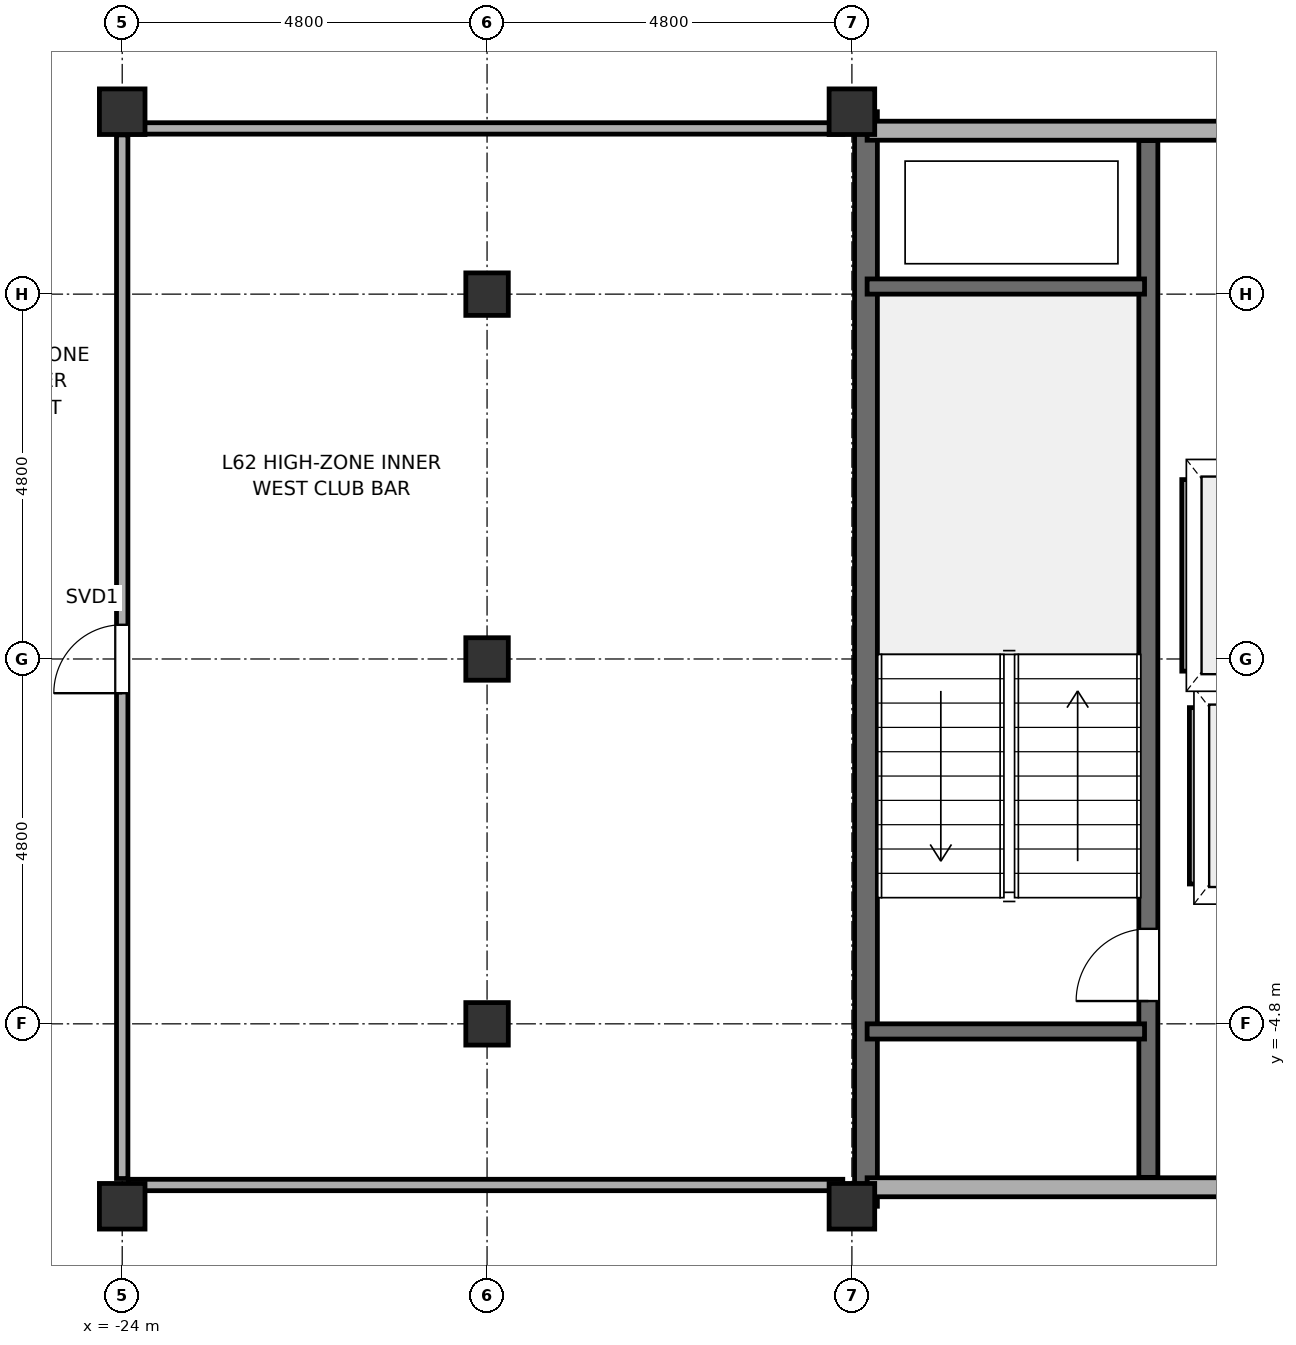
"""IFC4 building model, lengths in metres.
Left out: names, types, materials, properties, quantities, classifications, styles, units other than length and angle.
Written with IfcOpenShell. Run it as: python <this file> out.ifc"""

import sys

from ifc_helpers import new_model, si_unit, direction, frame, frame_2d, origin, origin_2d, place, context, subcontext, project, spatial, rectangle, hollow_rectangle, hollow_circle, extrude, element, fill, save


model = new_model("IFC4")
c1 = context("Model", 3, precision=1e-05, world=origin(), true_north=direction((0.0, 1.0)))
c2 = subcontext(c1, "Body", "Model", "MODEL_VIEW")
j1 = project(units=[si_unit("LENGTHUNIT", "METRE"), si_unit("PLANEANGLEUNIT", "RADIAN")], contexts=[c1])
p1 = place(None, origin())
s1 = spatial("IfcSite", under=j1, at=p1, CompositionType="ELEMENT")
p2 = place(p1, origin())
s2 = spatial("IfcBuilding", under=s1, at=p2, CompositionType="ELEMENT")
p3 = place(p2, frame((0.0, 0.0, 249.25)))
s3 = spatial("IfcBuildingStorey", under=s2, at=p3, CompositionType="ELEMENT", Elevation=249.25)
for number, where, z_axis, x_axis in (
    (1, (-24.0, -7.2, 0.0), (0.0, 0.0, 1.0), (1.0, 0.0, 0.0)),
    (2, (-24.0, 7.2, 0.0), (0.0, 0.0, 1.0), (1.0, 0.0, 0.0)),
):
    element("IfcColumn", number, at=place(p3, frame(where, z_axis=z_axis, x_axis=x_axis)), inside=s3, PredefinedType="COLUMN", context=c2, shape_type="SweptSolid", body=[
        extrude(hollow_rectangle(XDim=0.6, YDim=0.6, WallThickness=0.028, at=origin_2d()), origin(), (0.0, 0.0, 1.0), 3.85),
    ])
for number, where, z_axis, x_axis in (
    (3, (-19.2, -4.8, 0.0), (0.0, 0.0, 1.0), (1.0, 0.0, 0.0)),
    (4, (-19.2, 0.0, 0.0), (0.0, 0.0, 1.0), (1.0, 0.0, 0.0)),
    (5, (-19.2, 4.8, 0.0), (0.0, 0.0, 1.0), (1.0, 0.0, 0.0)),
):
    element("IfcColumn", number, at=place(p3, frame(where, z_axis=z_axis, x_axis=x_axis)), inside=s3, PredefinedType="COLUMN", context=c2, shape_type="SweptSolid", body=[
        extrude(hollow_circle(Radius=0.28, WallThickness=0.025, at=origin_2d()), origin(), (0.0, 0.0, 1.0), 3.85),
    ])
for number, where, z_axis, x_axis in (
    (6, (-14.4, -7.2, 0.0), (0.0, 0.0, 1.0), (1.0, 0.0, 0.0)),
    (7, (-14.4, 7.2, 0.0), (0.0, 0.0, 1.0), (1.0, 0.0, 0.0)),
):
    element("IfcColumn", number, at=place(p3, frame(where, z_axis=z_axis, x_axis=x_axis)), inside=s3, PredefinedType="COLUMN", context=c2, shape_type="SweptSolid", body=[
        extrude(hollow_rectangle(XDim=0.6, YDim=0.6, WallThickness=0.028, at=origin_2d()), origin(), (0.0, 0.0, 1.0), 3.85),
    ])
p4 = place(p3, frame((-14.215, -7.2, -0.18), z_axis=(0.0, 0.0, 1.0), x_axis=(0.0, 1.0, 0.0)))
e8 = element("IfcWall", 8, at=p4, inside=s3, PredefinedType="SHEAR", context=c2, shape_type="SweptSolid", body=[
    extrude(rectangle(XDim=14.4, YDim=0.3, at=frame_2d((7.2, 0.0))), origin(), (0.0, 0.0, 1.0), 3.85),
])
p5 = place(p3, frame((-14.2, -6.95, 0.0), z_axis=(0.0, 0.0, 1.0), x_axis=(1.0, 0.0, 0.0)))
e9 = element("IfcWall", 9, at=p5, inside=s3, PredefinedType="SOLIDWALL", context=c2, shape_type="SweptSolid", body=[
    extrude(rectangle(XDim=9.4, YDim=0.25, at=frame_2d((4.7, 0.0))), origin(), (0.0, 0.0, 1.0), 2.27),
])
p6 = place(p5, frame((4.9, 0.0, 0.0)))
e10 = element("IfcOpeningElement", 10, at=p6, cuts=e9, PredefinedType="OPENING", context=c2, shape_type="SweptSolid", body=[
    extrude(rectangle(XDim=1.0, YDim=2.15, at=frame_2d((0.5, 1.075))), frame((0.0, 0.14, 0.0), z_axis=(0.0, -1.0, 0.0), x_axis=(1.0, 0.0, 0.0)), (0.0, 0.0, 1.0), 0.28),
])
p7 = place(p3, frame((-14.2, 6.95, 0.0), z_axis=(0.0, 0.0, 1.0), x_axis=(1.0, 0.0, 0.0)))
e11 = element("IfcWall", 11, at=p7, inside=s3, PredefinedType="SOLIDWALL", context=c2, shape_type="SweptSolid", body=[
    extrude(rectangle(XDim=9.4, YDim=0.25, at=frame_2d((4.7, 0.0))), origin(), (0.0, 0.0, 1.0), 2.27),
])
p8 = place(p7, frame((4.9, 0.0, 0.0)))
e12 = element("IfcOpeningElement", 12, at=p8, cuts=e11, PredefinedType="OPENING", context=c2, shape_type="SweptSolid", body=[
    extrude(rectangle(XDim=1.0, YDim=2.15, at=frame_2d((0.5, 1.075))), frame((0.0, 0.14, 0.0), z_axis=(0.0, -1.0, 0.0), x_axis=(1.0, 0.0, 0.0)), (0.0, 0.0, 1.0), 0.28),
])
p9 = place(p3, frame((-10.5, -6.82, -0.18), z_axis=(0.0, 0.0, 1.0), x_axis=(0.0, 1.0, 0.0)))
e13 = element("IfcWall", 13, at=p9, inside=s3, PredefinedType="SOLIDWALL", context=c2, shape_type="SweptSolid", body=[
    extrude(rectangle(XDim=13.64, YDim=0.25, at=frame_2d((6.82, 0.0))), origin(), (0.0, 0.0, 1.0), 3.85),
])
p10 = place(p9, frame((2.32, 0.0, 0.18)))
e14 = element("IfcOpeningElement", 14, at=p10, cuts=e13, PredefinedType="OPENING", context=c2, shape_type="SweptSolid", body=[
    extrude(rectangle(XDim=0.95, YDim=2.15, at=frame_2d((0.475, 1.075))), frame((0.0, 0.14, 0.0), z_axis=(0.0, -1.0, 0.0), x_axis=(1.0, 0.0, 0.0)), (0.0, 0.0, 1.0), 0.28),
])
for number, where, z_axis, x_axis in (
    (15, (-14.2, -4.9, -0.18), (0.0, 0.0, 1.0), (1.0, 0.0, 0.0)),
    (16, (-14.2, 4.9, -0.18), (0.0, 0.0, 1.0), (1.0, 0.0, 0.0)),
):
    element("IfcWall", number, at=place(p3, frame(where, z_axis=z_axis, x_axis=x_axis)), inside=s3, PredefinedType="SOLIDWALL", context=c2, shape_type="SweptSolid", body=[
        extrude(rectangle(XDim=3.65, YDim=0.2, at=frame_2d((1.825, 0.0))), origin(), (0.0, 0.0, 1.0), 3.85),
    ])
p11 = place(p3, frame((-9.82, -3.1, 0.0), z_axis=(0.0, 0.0, 1.0), x_axis=(1.0, 0.0, 0.0)))
e17 = element("IfcWall", 17, at=p11, inside=s3, PredefinedType="SOLIDWALL", context=c2, shape_type="SweptSolid", body=[
    extrude(rectangle(XDim=2.04, YDim=0.2, at=frame_2d((1.02, 0.0))), origin(), (0.0, 0.0, 1.0), 3.67),
])
p12 = place(p11, frame((0.47, 0.0, 0.0)))
e18 = element("IfcOpeningElement", 18, at=p12, cuts=e17, PredefinedType="OPENING", context=c2, shape_type="SweptSolid", body=[
    extrude(rectangle(XDim=1.1, YDim=2.2, at=frame_2d((0.55, 1.1))), frame((0.0, 0.115, 0.0), z_axis=(0.0, -1.0, 0.0), x_axis=(1.0, 0.0, 0.0)), (0.0, 0.0, 1.0), 0.23),
])
p13 = place(p3, frame((-9.82, -0.5, 0.0), z_axis=(0.0, 0.0, 1.0), x_axis=(1.0, 0.0, 0.0)))
e19 = element("IfcWall", 19, at=p13, inside=s3, PredefinedType="SOLIDWALL", context=c2, shape_type="SweptSolid", body=[
    extrude(rectangle(XDim=2.04, YDim=0.2, at=frame_2d((1.02, 0.0))), origin(), (0.0, 0.0, 1.0), 3.67),
])
p14 = place(p3, frame((-9.9, -2.96, 0.0), z_axis=(0.0, 0.0, 1.0), x_axis=(0.0, 1.0, 0.0)))
e20 = element("IfcWall", 20, at=p14, inside=s3, PredefinedType="PARTITIONING", context=c2, shape_type="SweptSolid", body=[
    extrude(rectangle(XDim=2.32, YDim=0.12, at=frame_2d((1.16, 0.0))), origin(), (0.0, 0.0, 1.0), 3.67),
])
p15 = place(p3, frame((-9.92, 2.5, 0.0), z_axis=(0.0, 0.0, 1.0), x_axis=(1.0, 0.0, 0.0)))
e21 = element("IfcWall", 21, at=p15, inside=s3, PredefinedType="SOLIDWALL", context=c2, shape_type="SweptSolid", body=[
    extrude(rectangle(XDim=2.24, YDim=0.2, at=frame_2d((1.12, 0.0))), origin(), (0.0, 0.0, 1.0), 3.67),
])
p16 = place(p15, frame((0.495, 0.0, 0.0)))
e22 = element("IfcOpeningElement", 22, at=p16, cuts=e21, PredefinedType="OPENING", context=c2, shape_type="SweptSolid", body=[
    extrude(rectangle(XDim=1.25, YDim=2.25, at=frame_2d((0.625, 1.125))), frame((0.0, 0.115, 0.0), z_axis=(0.0, -1.0, 0.0), x_axis=(1.0, 0.0, 0.0)), (0.0, 0.0, 1.0), 0.23),
])
p17 = place(p3, frame((-9.92, -0.3, 0.0), z_axis=(0.0, 0.0, 1.0), x_axis=(1.0, 0.0, 0.0)))
e23 = element("IfcWall", 23, at=p17, inside=s3, PredefinedType="SOLIDWALL", context=c2, shape_type="SweptSolid", body=[
    extrude(rectangle(XDim=2.24, YDim=0.2, at=frame_2d((1.12, 0.0))), origin(), (0.0, 0.0, 1.0), 3.67),
])
p18 = place(p3, frame((-10.0, -0.16, 0.0), z_axis=(0.0, 0.0, 1.0), x_axis=(0.0, 1.0, 0.0)))
e24 = element("IfcWall", 24, at=p18, inside=s3, PredefinedType="PARTITIONING", context=c2, shape_type="SweptSolid", body=[
    extrude(rectangle(XDim=2.52, YDim=0.12, at=frame_2d((1.26, 0.0))), origin(), (0.0, 0.0, 1.0), 3.67),
])
for number, where, z_axis, x_axis in (
    (25, (-23.92, -6.92, 0.0), (0.0, 0.0, 1.0), (1.0, 0.0, 0.0)),
    (26, (-23.92, 6.98, 0.0), (0.0, 0.0, 1.0), (1.0, 0.0, 0.0)),
):
    element("IfcWall", number, at=place(p3, frame(where, z_axis=z_axis, x_axis=x_axis)), inside=s3, PredefinedType="PARTITIONING", context=c2, shape_type="SweptSolid", body=[
        extrude(rectangle(XDim=9.4, YDim=0.15, at=frame_2d((4.7, 0.0))), origin(), (0.0, 0.0, 1.0), 2.27),
    ])
p19 = place(p3, frame((-24.0, -6.835, 0.0), z_axis=(0.0, 0.0, 1.0), x_axis=(0.0, 1.0, 0.0)))
e27 = element("IfcWall", 27, at=p19, inside=s3, PredefinedType="PARTITIONING", context=c2, shape_type="SweptSolid", body=[
    extrude(rectangle(XDim=13.73, YDim=0.15, at=frame_2d((6.865, 0.0))), origin(), (0.0, 0.0, 1.0), 2.27),
])
p20 = place(p19, frame((6.385, 0.0, 0.0)))
e28 = element("IfcOpeningElement", 28, at=p20, cuts=e27, PredefinedType="OPENING", context=c2, shape_type="SweptSolid", body=[
    extrude(rectangle(XDim=0.9, YDim=2.1, at=frame_2d((0.45, 1.05))), frame((0.0, 0.09, 0.0), z_axis=(0.0, -1.0, 0.0), x_axis=(1.0, 0.0, 0.0)), (0.0, 0.0, 1.0), 0.18),
])
p21 = place(p10, origin())
e29 = element("IfcDoor", 29, at=p21, inside=s3, OperationType="SINGLE_SWING_LEFT", PredefinedType="DOOR", context=c2, shape_type="SweptSolid", body=[
    extrude(rectangle(XDim=0.95, YDim=2.15, at=frame_2d((0.475, 1.075))), frame((0.0, 0.025, 0.0), z_axis=(0.0, -1.0, 0.0), x_axis=(1.0, 0.0, 0.0)), (0.0, 0.0, 1.0), 0.05),
])
fill(e14, e29)
p22 = place(p20, origin())
e30 = element("IfcDoor", 30, at=p22, inside=s3, OperationType="SINGLE_SWING_LEFT", PredefinedType="DOOR", context=c2, shape_type="SweptSolid", body=[
    extrude(rectangle(XDim=0.9, YDim=2.1, at=frame_2d((0.45, 1.05))), frame((0.0, 0.025, 0.0), z_axis=(0.0, -1.0, 0.0), x_axis=(1.0, 0.0, 0.0)), (0.0, 0.0, 1.0), 0.05),
])
fill(e28, e30)
save(model, sys.argv[1])
